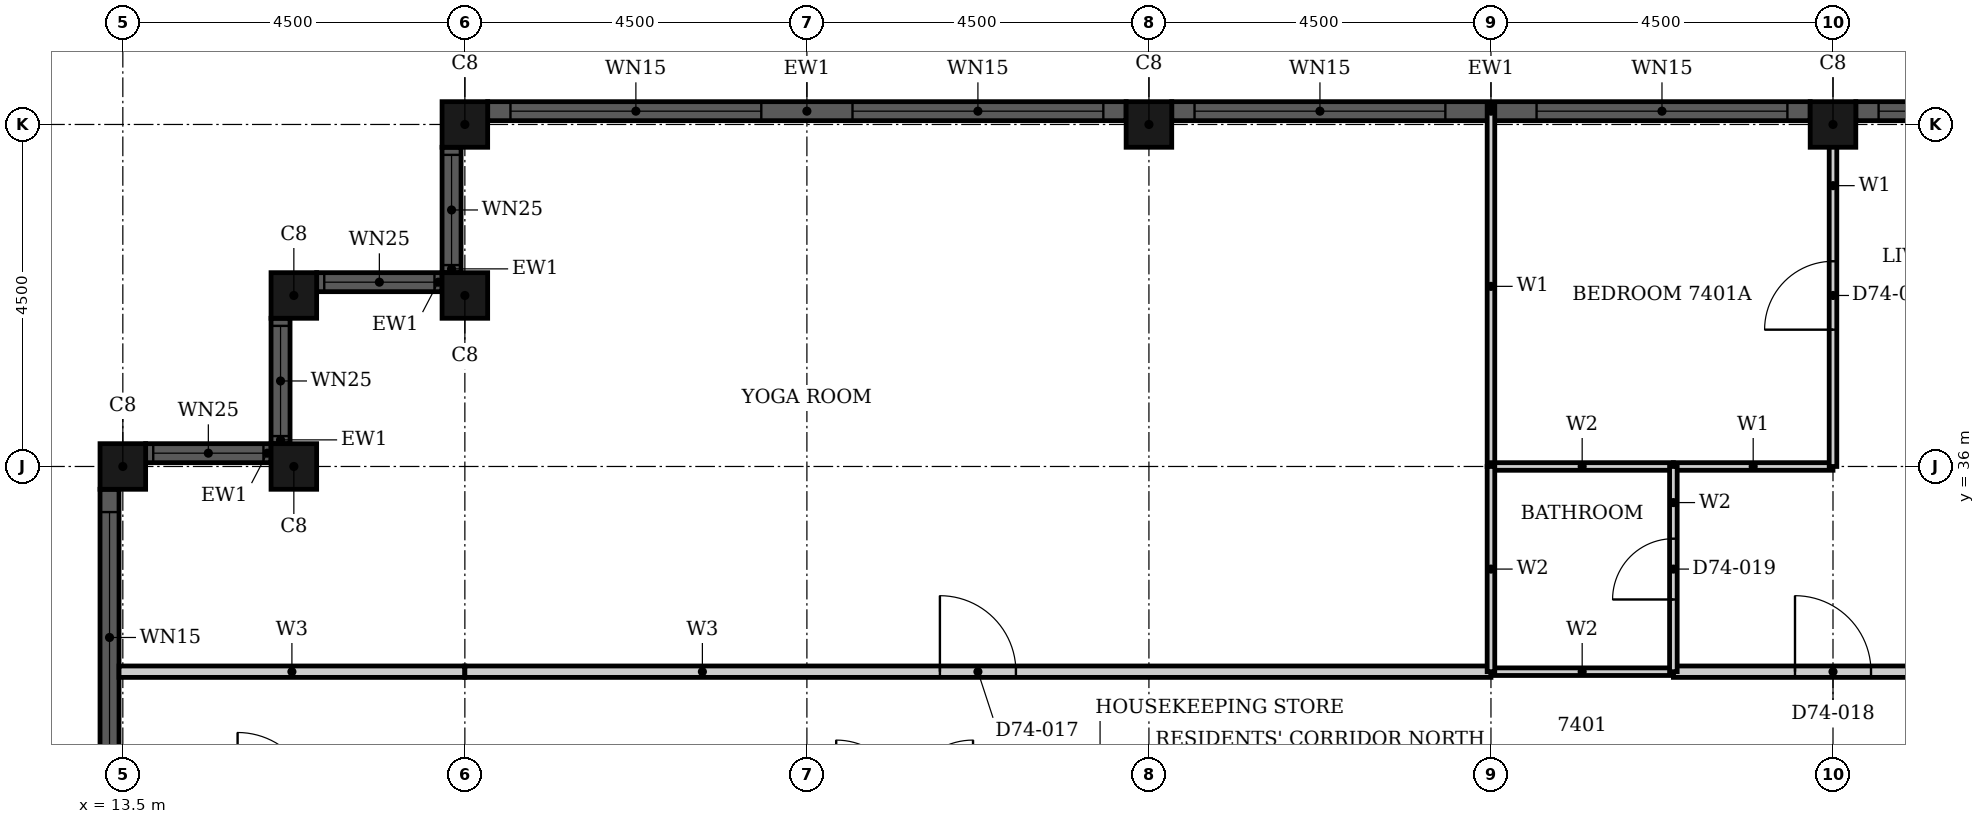
"""IFC4 building model, lengths in metres.
Left out: names, types, materials, properties, quantities, classifications, styles, units other than length and angle.
Written with IfcOpenShell. Run it as: python <this file> out.ifc"""

import sys

from ifc_helpers import new_model, si_unit, direction, frame, frame_2d, origin, origin_2d, place, context, subcontext, project, spatial, rectangle, hollow_rectangle, extrude, element, fill, save


model = new_model("IFC4")
c1 = context("Model", 3, precision=1e-05, world=origin(), true_north=direction((0.0, 1.0)))
c2 = subcontext(c1, "Body", "Model", "MODEL_VIEW")
j1 = project(units=[si_unit("LENGTHUNIT", "METRE"), si_unit("PLANEANGLEUNIT", "RADIAN")], contexts=[c1])
p1 = place(None, origin())
s1 = spatial("IfcSite", under=j1, at=p1, CompositionType="ELEMENT")
p2 = place(p1, origin())
s2 = spatial("IfcBuilding", under=s1, at=p2, CompositionType="ELEMENT")
p3 = place(p2, frame((0.0, 0.0, 290.8)))
s3 = spatial("IfcBuildingStorey", under=s2, at=p3, CompositionType="ELEMENT", Elevation=290.8)
for number, where, z_axis, x_axis in (
    (1, (36.0, 40.5, 0.0), (0.0, 0.0, 1.0), (1.0, 0.0, 0.0)),
    (2, (27.0, 40.5, 0.0), (0.0, 0.0, 1.0), (1.0, 0.0, 0.0)),
    (3, (18.0, 40.5, 0.0), (0.0, 0.0, 1.0), (1.0, 0.0, 0.0)),
    (4, (18.0, 38.25, 0.0), (0.0, 0.0, 1.0), (1.0, 0.0, 0.0)),
    (5, (15.75, 38.25, 0.0), (0.0, 0.0, 1.0), (1.0, 0.0, 0.0)),
    (6, (15.75, 36.0, 0.0), (0.0, 0.0, 1.0), (1.0, 0.0, 0.0)),
    (7, (13.5, 36.0, 0.0), (0.0, 0.0, 1.0), (1.0, 0.0, 0.0)),
):
    element("IfcColumn", number, at=place(p3, frame(where, z_axis=z_axis, x_axis=x_axis)), inside=s3, PredefinedType="COLUMN", context=c2, shape_type="SweptSolid", body=[
        extrude(hollow_rectangle(XDim=0.6, YDim=0.6, WallThickness=0.02, at=origin_2d()), origin(), (0.0, 0.0, 1.0), 3.7),
    ])
p4 = place(p3, frame((44.7, 40.675, 0.0), z_axis=(0.0, 0.0, 1.0), x_axis=(-1.0, 0.0, 0.0)))
e8 = element("IfcWall", 8, at=p4, inside=s3, PredefinedType="SOLIDWALL", context=c2, shape_type="SweptSolid", body=[
    extrude(rectangle(XDim=8.4, YDim=0.25, at=frame_2d((4.2, 0.0))), origin(), (0.0, 0.0, 1.0), 3.7),
])
p5 = place(p4, frame((0.3, 0.0, 0.45)))
e9 = element("IfcOpeningElement", 9, at=p5, cuts=e8, PredefinedType="OPENING", context=c2, shape_type="SweptSolid", body=[
    extrude(rectangle(XDim=3.3, YDim=2.3, at=frame_2d((1.65, 1.15))), frame((0.0, 0.135, 0.0), z_axis=(0.0, -1.0, 0.0), x_axis=(1.0, 0.0, 0.0)), (0.0, 0.0, 1.0), 0.27),
])
p6 = place(p4, frame((4.8, 0.0, 0.45)))
e10 = element("IfcOpeningElement", 10, at=p6, cuts=e8, PredefinedType="OPENING", context=c2, shape_type="SweptSolid", body=[
    extrude(rectangle(XDim=3.3, YDim=2.3, at=frame_2d((1.65, 1.15))), frame((0.0, 0.135, 0.0), z_axis=(0.0, -1.0, 0.0), x_axis=(1.0, 0.0, 0.0)), (0.0, 0.0, 1.0), 0.27),
])
p7 = place(p3, frame((35.7, 40.675, 0.0), z_axis=(0.0, 0.0, 1.0), x_axis=(-1.0, 0.0, 0.0)))
e11 = element("IfcWall", 11, at=p7, inside=s3, PredefinedType="SOLIDWALL", context=c2, shape_type="SweptSolid", body=[
    extrude(rectangle(XDim=8.4, YDim=0.25, at=frame_2d((4.2, 0.0))), origin(), (0.0, 0.0, 1.0), 3.7),
])
p8 = place(p7, frame((0.3, 0.0, 0.45)))
e12 = element("IfcOpeningElement", 12, at=p8, cuts=e11, PredefinedType="OPENING", context=c2, shape_type="SweptSolid", body=[
    extrude(rectangle(XDim=3.3, YDim=2.3, at=frame_2d((1.65, 1.15))), frame((0.0, 0.135, 0.0), z_axis=(0.0, -1.0, 0.0), x_axis=(1.0, 0.0, 0.0)), (0.0, 0.0, 1.0), 0.27),
])
p9 = place(p7, frame((4.8, 0.0, 0.45)))
e13 = element("IfcOpeningElement", 13, at=p9, cuts=e11, PredefinedType="OPENING", context=c2, shape_type="SweptSolid", body=[
    extrude(rectangle(XDim=3.3, YDim=2.3, at=frame_2d((1.65, 1.15))), frame((0.0, 0.135, 0.0), z_axis=(0.0, -1.0, 0.0), x_axis=(1.0, 0.0, 0.0)), (0.0, 0.0, 1.0), 0.27),
])
p10 = place(p3, frame((26.7, 40.675, 0.0), z_axis=(0.0, 0.0, 1.0), x_axis=(-1.0, 0.0, 0.0)))
e14 = element("IfcWall", 14, at=p10, inside=s3, PredefinedType="SOLIDWALL", context=c2, shape_type="SweptSolid", body=[
    extrude(rectangle(XDim=8.4, YDim=0.25, at=frame_2d((4.2, 0.0))), origin(), (0.0, 0.0, 1.0), 3.7),
])
p11 = place(p10, frame((0.3, 0.0, 0.45)))
e15 = element("IfcOpeningElement", 15, at=p11, cuts=e14, PredefinedType="OPENING", context=c2, shape_type="SweptSolid", body=[
    extrude(rectangle(XDim=3.3, YDim=2.3, at=frame_2d((1.65, 1.15))), frame((0.0, 0.135, 0.0), z_axis=(0.0, -1.0, 0.0), x_axis=(1.0, 0.0, 0.0)), (0.0, 0.0, 1.0), 0.27),
])
p12 = place(p10, frame((4.8, 0.0, 0.45)))
e16 = element("IfcOpeningElement", 16, at=p12, cuts=e14, PredefinedType="OPENING", context=c2, shape_type="SweptSolid", body=[
    extrude(rectangle(XDim=3.3, YDim=2.3, at=frame_2d((1.65, 1.15))), frame((0.0, 0.135, 0.0), z_axis=(0.0, -1.0, 0.0), x_axis=(1.0, 0.0, 0.0)), (0.0, 0.0, 1.0), 0.27),
])
p13 = place(p3, frame((17.825, 40.2, 0.0), z_axis=(0.0, 0.0, 1.0), x_axis=(0.0, -1.0, 0.0)))
e17 = element("IfcWall", 17, at=p13, inside=s3, PredefinedType="SOLIDWALL", context=c2, shape_type="SweptSolid", body=[
    extrude(rectangle(XDim=1.65, YDim=0.25, at=frame_2d((0.825, 0.0))), origin(), (0.0, 0.0, 1.0), 3.7),
])
p14 = place(p13, frame((0.1, 0.0, 0.9)))
e18 = element("IfcOpeningElement", 18, at=p14, cuts=e17, PredefinedType="OPENING", context=c2, shape_type="SweptSolid", body=[
    extrude(rectangle(XDim=1.45, YDim=1.85, at=frame_2d((0.725, 0.925))), frame((0.0, 0.135, 0.0), z_axis=(0.0, -1.0, 0.0), x_axis=(1.0, 0.0, 0.0)), (0.0, 0.0, 1.0), 0.27),
])
p15 = place(p3, frame((17.7, 38.425, 0.0), z_axis=(0.0, 0.0, 1.0), x_axis=(-1.0, 0.0, 0.0)))
e19 = element("IfcWall", 19, at=p15, inside=s3, PredefinedType="SOLIDWALL", context=c2, shape_type="SweptSolid", body=[
    extrude(rectangle(XDim=1.65, YDim=0.25, at=frame_2d((0.825, 0.0))), origin(), (0.0, 0.0, 1.0), 3.7),
])
p16 = place(p15, frame((0.1, 0.0, 0.9)))
e20 = element("IfcOpeningElement", 20, at=p16, cuts=e19, PredefinedType="OPENING", context=c2, shape_type="SweptSolid", body=[
    extrude(rectangle(XDim=1.45, YDim=1.85, at=frame_2d((0.725, 0.925))), frame((0.0, 0.135, 0.0), z_axis=(0.0, -1.0, 0.0), x_axis=(1.0, 0.0, 0.0)), (0.0, 0.0, 1.0), 0.27),
])
p17 = place(p3, frame((15.575, 37.95, 0.0), z_axis=(0.0, 0.0, 1.0), x_axis=(0.0, -1.0, 0.0)))
e21 = element("IfcWall", 21, at=p17, inside=s3, PredefinedType="SOLIDWALL", context=c2, shape_type="SweptSolid", body=[
    extrude(rectangle(XDim=1.65, YDim=0.25, at=frame_2d((0.825, 0.0))), origin(), (0.0, 0.0, 1.0), 3.7),
])
p18 = place(p17, frame((0.1, 0.0, 0.9)))
e22 = element("IfcOpeningElement", 22, at=p18, cuts=e21, PredefinedType="OPENING", context=c2, shape_type="SweptSolid", body=[
    extrude(rectangle(XDim=1.45, YDim=1.85, at=frame_2d((0.725, 0.925))), frame((0.0, 0.135, 0.0), z_axis=(0.0, -1.0, 0.0), x_axis=(1.0, 0.0, 0.0)), (0.0, 0.0, 1.0), 0.27),
])
p19 = place(p3, frame((15.45, 36.175, 0.0), z_axis=(0.0, 0.0, 1.0), x_axis=(-1.0, 0.0, 0.0)))
e23 = element("IfcWall", 23, at=p19, inside=s3, PredefinedType="SOLIDWALL", context=c2, shape_type="SweptSolid", body=[
    extrude(rectangle(XDim=1.65, YDim=0.25, at=frame_2d((0.825, 0.0))), origin(), (0.0, 0.0, 1.0), 3.7),
])
p20 = place(p19, frame((0.1, 0.0, 0.9)))
e24 = element("IfcOpeningElement", 24, at=p20, cuts=e23, PredefinedType="OPENING", context=c2, shape_type="SweptSolid", body=[
    extrude(rectangle(XDim=1.45, YDim=1.85, at=frame_2d((0.725, 0.925))), frame((0.0, 0.135, 0.0), z_axis=(0.0, -1.0, 0.0), x_axis=(1.0, 0.0, 0.0)), (0.0, 0.0, 1.0), 0.27),
])
p21 = place(p3, frame((13.325, 35.7, 0.0), z_axis=(0.0, 0.0, 1.0), x_axis=(0.0, -1.0, 0.0)))
e25 = element("IfcWall", 25, at=p21, inside=s3, PredefinedType="SOLIDWALL", context=c2, shape_type="SweptSolid", body=[
    extrude(rectangle(XDim=8.4, YDim=0.25, at=frame_2d((4.2, 0.0))), origin(), (0.0, 0.0, 1.0), 3.7),
])
p22 = place(p21, frame((0.3, 0.0, 0.45)))
e26 = element("IfcOpeningElement", 26, at=p22, cuts=e25, PredefinedType="OPENING", context=c2, shape_type="SweptSolid", body=[
    extrude(rectangle(XDim=3.3, YDim=2.3, at=frame_2d((1.65, 1.15))), frame((0.0, 0.135, 0.0), z_axis=(0.0, -1.0, 0.0), x_axis=(1.0, 0.0, 0.0)), (0.0, 0.0, 1.0), 0.27),
])
p23 = place(p21, frame((4.8, 0.0, 0.45)))
e27 = element("IfcOpeningElement", 27, at=p23, cuts=e25, PredefinedType="OPENING", context=c2, shape_type="SweptSolid", body=[
    extrude(rectangle(XDim=3.3, YDim=2.3, at=frame_2d((1.65, 1.15))), frame((0.0, 0.135, 0.0), z_axis=(0.0, -1.0, 0.0), x_axis=(1.0, 0.0, 0.0)), (0.0, 0.0, 1.0), 0.27),
])
p24 = place(p3, frame((13.45, 33.3, 0.0), z_axis=(0.0, 0.0, 1.0), x_axis=(1.0, 0.0, 0.0)))
e28 = element("IfcWall", 28, at=p24, inside=s3, PredefinedType="PARTITIONING", context=c2, shape_type="SweptSolid", body=[
    extrude(rectangle(XDim=4.549, YDim=0.15, at=frame_2d((2.274, 0.0))), origin(), (0.0, 0.0, 1.0), 3.4),
])
p25 = place(p3, frame((18.0, 33.3, 0.0), z_axis=(0.0, 0.0, 1.0), x_axis=(1.0, 0.0, 0.0)))
e29 = element("IfcWall", 29, at=p25, inside=s3, PredefinedType="PARTITIONING", context=c2, shape_type="SweptSolid", body=[
    extrude(rectangle(XDim=13.5, YDim=0.15, at=frame_2d((6.75, 0.0))), origin(), (0.0, 0.0, 1.0), 3.4),
])
p26 = place(p25, frame((6.25, 0.0, 0.0)))
e30 = element("IfcOpeningElement", 30, at=p26, cuts=e29, PredefinedType="OPENING", context=c2, shape_type="SweptSolid", body=[
    extrude(rectangle(XDim=1.0, YDim=2.1, at=frame_2d((0.5, 1.05))), frame((0.0, 0.085, 0.0), z_axis=(0.0, -1.0, 0.0), x_axis=(1.0, 0.0, 0.0)), (0.0, 0.0, 1.0), 0.17),
])
p27 = place(p3, frame((33.9, 33.3, 0.0), z_axis=(0.0, 0.0, 1.0), x_axis=(1.0, 0.0, 0.0)))
e31 = element("IfcWall", 31, at=p27, inside=s3, PredefinedType="PARTITIONING", context=c2, shape_type="SweptSolid", body=[
    extrude(rectangle(XDim=11.1, YDim=0.15, at=frame_2d((5.55, 0.0))), origin(), (0.0, 0.0, 1.0), 3.4),
])
p28 = place(p27, frame((1.6, 0.0, 0.0)))
e32 = element("IfcOpeningElement", 32, at=p28, cuts=e31, PredefinedType="OPENING", context=c2, shape_type="SweptSolid", body=[
    extrude(rectangle(XDim=1.0, YDim=2.2, at=frame_2d((0.5, 1.1))), frame((0.0, 0.085, 0.0), z_axis=(0.0, -1.0, 0.0), x_axis=(1.0, 0.0, 0.0)), (0.0, 0.0, 1.0), 0.17),
])
p29 = place(p3, frame((33.9, 36.0, 0.0), z_axis=(0.0, 0.0, 1.0), x_axis=(1.0, 0.0, 0.0)))
e33 = element("IfcWall", 33, at=p29, inside=s3, PredefinedType="PARTITIONING", context=c2, shape_type="SweptSolid", body=[
    extrude(rectangle(XDim=2.1, YDim=0.1, at=frame_2d((1.05, 0.0))), origin(), (0.0, 0.0, 1.0), 3.4),
])
p30 = place(p3, frame((31.5, 36.0, 0.0), z_axis=(0.0, 0.0, 1.0), x_axis=(0.0, 1.0, 0.0)))
e34 = element("IfcWall", 34, at=p30, inside=s3, PredefinedType="PARTITIONING", context=c2, shape_type="SweptSolid", body=[
    extrude(rectangle(XDim=4.74, YDim=0.1, at=frame_2d((2.37, 0.0))), origin(), (0.0, 0.0, 1.0), 3.4),
])
p31 = place(p3, frame((36.0, 36.0, 0.0), z_axis=(0.0, 0.0, 1.0), x_axis=(0.0, 1.0, 0.0)))
e35 = element("IfcWall", 35, at=p31, inside=s3, PredefinedType="PARTITIONING", context=c2, shape_type="SweptSolid", body=[
    extrude(rectangle(XDim=4.69, YDim=0.1, at=frame_2d((2.345, 0.0))), origin(), (0.0, 0.0, 1.0), 3.4),
])
p32 = place(p31, frame((1.8, 0.0, 0.0)))
e36 = element("IfcOpeningElement", 36, at=p32, cuts=e35, PredefinedType="OPENING", context=c2, shape_type="SweptSolid", body=[
    extrude(rectangle(XDim=0.9, YDim=2.1, at=frame_2d((0.45, 1.05))), frame((0.0, 0.06, 0.0), z_axis=(0.0, -1.0, 0.0), x_axis=(1.0, 0.0, 0.0)), (0.0, 0.0, 1.0), 0.12),
])
for number, where, z_axis, x_axis in (
    (37, (31.5, 33.3, 0.0), (0.0, 0.0, 1.0), (1.0, 0.0, 0.0)),
    (38, (31.5, 36.0, 0.0), (0.0, 0.0, 1.0), (1.0, 0.0, 0.0)),
):
    element("IfcWall", number, at=place(p3, frame(where, z_axis=z_axis, x_axis=x_axis)), inside=s3, PredefinedType="PARTITIONING", context=c2, shape_type="SweptSolid", body=[
        extrude(rectangle(XDim=2.4, YDim=0.1, at=frame_2d((1.2, 0.0))), origin(), (0.0, 0.0, 1.0), 3.4),
    ])
p33 = place(p3, frame((31.5, 33.3, 0.0), z_axis=(0.0, 0.0, 1.0), x_axis=(0.0, 1.0, 0.0)))
e39 = element("IfcWall", 39, at=p33, inside=s3, PredefinedType="PARTITIONING", context=c2, shape_type="SweptSolid", body=[
    extrude(rectangle(XDim=2.7, YDim=0.1, at=frame_2d((1.35, 0.0))), origin(), (0.0, 0.0, 1.0), 3.4),
])
p34 = place(p3, frame((33.9, 33.3, 0.0), z_axis=(0.0, 0.0, 1.0), x_axis=(0.0, 1.0, 0.0)))
e40 = element("IfcWall", 40, at=p34, inside=s3, PredefinedType="PARTITIONING", context=c2, shape_type="SweptSolid", body=[
    extrude(rectangle(XDim=2.7, YDim=0.1, at=frame_2d((1.35, 0.0))), origin(), (0.0, 0.0, 1.0), 3.4),
])
p35 = place(p34, frame((0.95, 0.0, 0.0)))
e41 = element("IfcOpeningElement", 41, at=p35, cuts=e40, PredefinedType="OPENING", context=c2, shape_type="SweptSolid", body=[
    extrude(rectangle(XDim=0.8, YDim=2.1, at=frame_2d((0.4, 1.05))), frame((0.0, 0.06, 0.0), z_axis=(0.0, -1.0, 0.0), x_axis=(1.0, 0.0, 0.0)), (0.0, 0.0, 1.0), 0.12),
])
p36 = place(p6, origin())
e42 = element("IfcWindow", 42, at=p36, inside=s3, PartitioningType="SINGLE_PANEL", PredefinedType="WINDOW", context=c2, shape_type="SweptSolid", body=[
    extrude(rectangle(XDim=3.3, YDim=2.3, at=frame_2d((1.65, 1.15))), frame((0.0, 0.03, 0.0), z_axis=(0.0, -1.0, 0.0), x_axis=(1.0, 0.0, 0.0)), (0.0, 0.0, 1.0), 0.06),
])
fill(e10, e42)
p37 = place(p8, origin())
e43 = element("IfcWindow", 43, at=p37, inside=s3, PartitioningType="SINGLE_PANEL", PredefinedType="WINDOW", context=c2, shape_type="SweptSolid", body=[
    extrude(rectangle(XDim=3.3, YDim=2.3, at=frame_2d((1.65, 1.15))), frame((0.0, 0.03, 0.0), z_axis=(0.0, -1.0, 0.0), x_axis=(1.0, 0.0, 0.0)), (0.0, 0.0, 1.0), 0.06),
])
fill(e12, e43)
p38 = place(p9, origin())
e44 = element("IfcWindow", 44, at=p38, inside=s3, PartitioningType="SINGLE_PANEL", PredefinedType="WINDOW", context=c2, shape_type="SweptSolid", body=[
    extrude(rectangle(XDim=3.3, YDim=2.3, at=frame_2d((1.65, 1.15))), frame((0.0, 0.03, 0.0), z_axis=(0.0, -1.0, 0.0), x_axis=(1.0, 0.0, 0.0)), (0.0, 0.0, 1.0), 0.06),
])
fill(e13, e44)
p39 = place(p11, origin())
e45 = element("IfcWindow", 45, at=p39, inside=s3, PartitioningType="SINGLE_PANEL", PredefinedType="WINDOW", context=c2, shape_type="SweptSolid", body=[
    extrude(rectangle(XDim=3.3, YDim=2.3, at=frame_2d((1.65, 1.15))), frame((0.0, 0.03, 0.0), z_axis=(0.0, -1.0, 0.0), x_axis=(1.0, 0.0, 0.0)), (0.0, 0.0, 1.0), 0.06),
])
fill(e15, e45)
p40 = place(p12, origin())
e46 = element("IfcWindow", 46, at=p40, inside=s3, PartitioningType="SINGLE_PANEL", PredefinedType="WINDOW", context=c2, shape_type="SweptSolid", body=[
    extrude(rectangle(XDim=3.3, YDim=2.3, at=frame_2d((1.65, 1.15))), frame((0.0, 0.03, 0.0), z_axis=(0.0, -1.0, 0.0), x_axis=(1.0, 0.0, 0.0)), (0.0, 0.0, 1.0), 0.06),
])
fill(e16, e46)
p41 = place(p14, origin())
e47 = element("IfcWindow", 47, at=p41, inside=s3, PartitioningType="SINGLE_PANEL", PredefinedType="WINDOW", context=c2, shape_type="SweptSolid", body=[
    extrude(rectangle(XDim=1.45, YDim=1.85, at=frame_2d((0.725, 0.925))), frame((0.0, 0.03, 0.0), z_axis=(0.0, -1.0, 0.0), x_axis=(1.0, 0.0, 0.0)), (0.0, 0.0, 1.0), 0.06),
])
fill(e18, e47)
p42 = place(p16, origin())
e48 = element("IfcWindow", 48, at=p42, inside=s3, PartitioningType="SINGLE_PANEL", PredefinedType="WINDOW", context=c2, shape_type="SweptSolid", body=[
    extrude(rectangle(XDim=1.45, YDim=1.85, at=frame_2d((0.725, 0.925))), frame((0.0, 0.03, 0.0), z_axis=(0.0, -1.0, 0.0), x_axis=(1.0, 0.0, 0.0)), (0.0, 0.0, 1.0), 0.06),
])
fill(e20, e48)
p43 = place(p18, origin())
e49 = element("IfcWindow", 49, at=p43, inside=s3, PartitioningType="SINGLE_PANEL", PredefinedType="WINDOW", context=c2, shape_type="SweptSolid", body=[
    extrude(rectangle(XDim=1.45, YDim=1.85, at=frame_2d((0.725, 0.925))), frame((0.0, 0.03, 0.0), z_axis=(0.0, -1.0, 0.0), x_axis=(1.0, 0.0, 0.0)), (0.0, 0.0, 1.0), 0.06),
])
fill(e22, e49)
p44 = place(p20, origin())
e50 = element("IfcWindow", 50, at=p44, inside=s3, PartitioningType="SINGLE_PANEL", PredefinedType="WINDOW", context=c2, shape_type="SweptSolid", body=[
    extrude(rectangle(XDim=1.45, YDim=1.85, at=frame_2d((0.725, 0.925))), frame((0.0, 0.03, 0.0), z_axis=(0.0, -1.0, 0.0), x_axis=(1.0, 0.0, 0.0)), (0.0, 0.0, 1.0), 0.06),
])
fill(e24, e50)
p45 = place(p22, origin())
e51 = element("IfcWindow", 51, at=p45, inside=s3, PartitioningType="SINGLE_PANEL", PredefinedType="WINDOW", context=c2, shape_type="SweptSolid", body=[
    extrude(rectangle(XDim=3.3, YDim=2.3, at=frame_2d((1.65, 1.15))), frame((0.0, 0.03, 0.0), z_axis=(0.0, -1.0, 0.0), x_axis=(1.0, 0.0, 0.0)), (0.0, 0.0, 1.0), 0.06),
])
fill(e26, e51)
p46 = place(p26, origin())
e52 = element("IfcDoor", 52, at=p46, inside=s3, OperationType="SINGLE_SWING_LEFT", PredefinedType="DOOR", context=c2, shape_type="SweptSolid", body=[
    extrude(rectangle(XDim=1.0, YDim=2.1, at=frame_2d((0.5, 1.05))), frame((0.0, 0.025, 0.0), z_axis=(0.0, -1.0, 0.0), x_axis=(1.0, 0.0, 0.0)), (0.0, 0.0, 1.0), 0.05),
])
fill(e30, e52)
p47 = place(p28, origin())
e53 = element("IfcDoor", 53, at=p47, inside=s3, OperationType="SINGLE_SWING_RIGHT", PredefinedType="DOOR", context=c2, shape_type="SweptSolid", body=[
    extrude(rectangle(XDim=1.0, YDim=2.2, at=frame_2d((0.5, 1.1))), frame((0.0, 0.025, 0.0), z_axis=(0.0, -1.0, 0.0), x_axis=(1.0, 0.0, 0.0)), (0.0, 0.0, 1.0), 0.05),
])
fill(e32, e53)
p48 = place(p35, origin())
e54 = element("IfcDoor", 54, at=p48, inside=s3, OperationType="SINGLE_SWING_RIGHT", PredefinedType="DOOR", context=c2, shape_type="SweptSolid", body=[
    extrude(rectangle(XDim=0.8, YDim=2.1, at=frame_2d((0.4, 1.05))), frame((0.0, 0.025, 0.0), z_axis=(0.0, -1.0, 0.0), x_axis=(1.0, 0.0, 0.0)), (0.0, 0.0, 1.0), 0.05),
])
fill(e41, e54)
p49 = place(p32, origin())
e55 = element("IfcDoor", 55, at=p49, inside=s3, OperationType="SINGLE_SWING_RIGHT", PredefinedType="DOOR", context=c2, shape_type="SweptSolid", body=[
    extrude(rectangle(XDim=0.9, YDim=2.1, at=frame_2d((0.45, 1.05))), frame((0.0, 0.025, 0.0), z_axis=(0.0, -1.0, 0.0), x_axis=(1.0, 0.0, 0.0)), (0.0, 0.0, 1.0), 0.05),
])
fill(e36, e55)
save(model, sys.argv[1])
